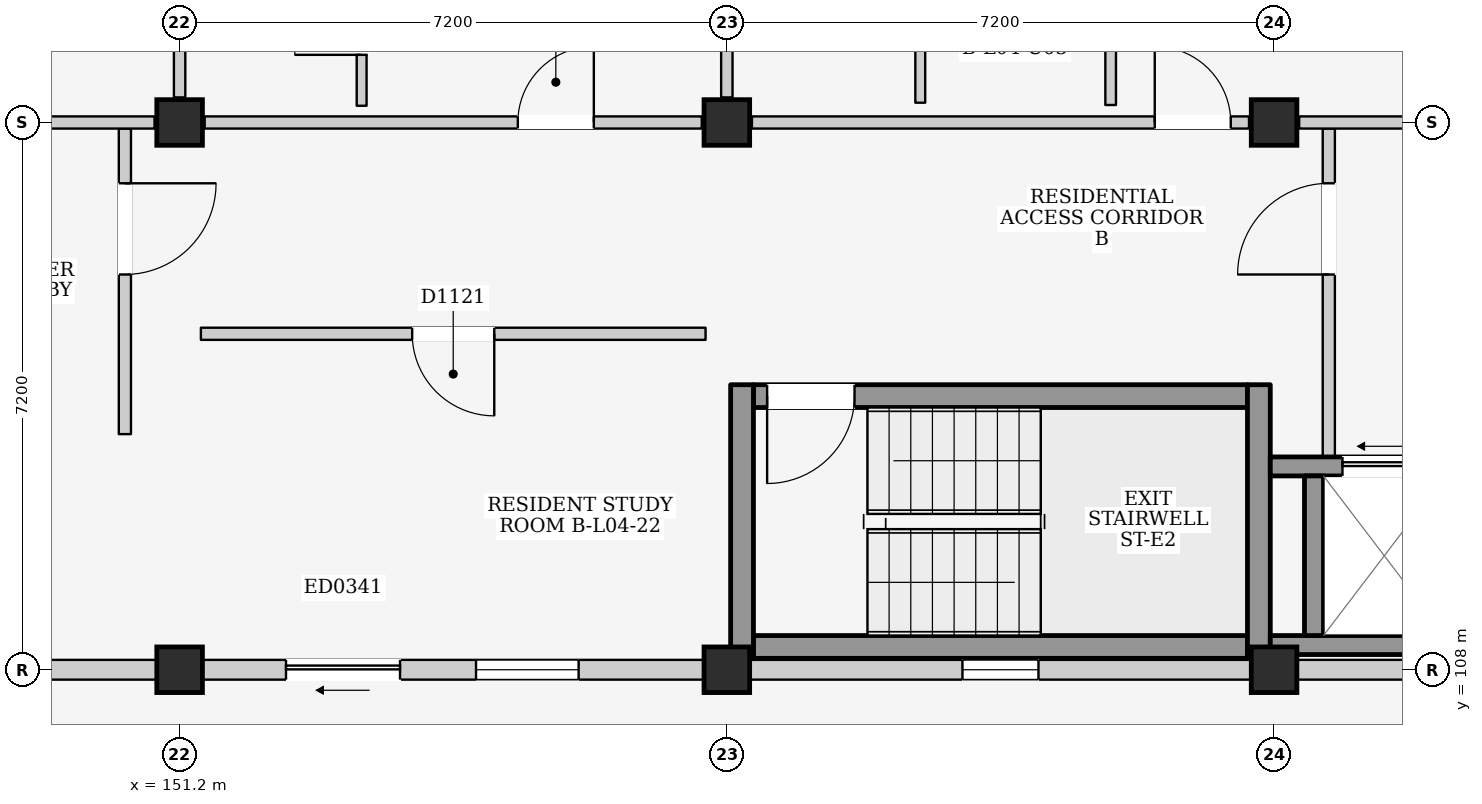
"""IFC4 building model, lengths in metres.
Left out: names, types, materials, properties, quantities, classifications, styles, units other than length and angle.
Written with IfcOpenShell. Run it as: python <this file> out.ifc"""

import sys

from ifc_helpers import new_model, si_unit, direction, frame, frame_2d, origin, origin_2d, place, context, subcontext, project, spatial, rectangle, extrude, element, fill, save


model = new_model("IFC4")
c1 = context("Model", 3, precision=1e-05, world=origin(), true_north=direction((0.0, 1.0)))
c2 = subcontext(c1, "Body", "Model", "MODEL_VIEW")
j1 = project(units=[si_unit("LENGTHUNIT", "METRE"), si_unit("PLANEANGLEUNIT", "RADIAN")], contexts=[c1])
p1 = place(None, origin())
s1 = spatial("IfcSite", under=j1, at=p1, CompositionType="ELEMENT")
p2 = place(p1, origin())
s2 = spatial("IfcBuilding", under=s1, at=p2, CompositionType="ELEMENT")
p3 = place(p2, frame((0.0, 0.0, 15.4)))
s3 = spatial("IfcBuildingStorey", under=s2, at=p3, CompositionType="ELEMENT", Elevation=15.4)
for number, where, z_axis, x_axis in (
    (1, (151.2, 108.0, 0.0), (0.0, 0.0, 1.0), (1.0, 0.0, 0.0)),
    (2, (151.2, 115.2, 0.0), (0.0, 0.0, 1.0), (1.0, 0.0, 0.0)),
    (3, (158.4, 108.0, 0.0), (0.0, 0.0, 1.0), (1.0, 0.0, 0.0)),
    (4, (158.4, 115.2, 0.0), (0.0, 0.0, 1.0), (1.0, 0.0, 0.0)),
    (5, (165.6, 108.0, 0.0), (0.0, 0.0, 1.0), (1.0, 0.0, 0.0)),
    (6, (165.6, 115.2, 0.0), (0.0, 0.0, 1.0), (1.0, 0.0, 0.0)),
):
    element("IfcColumn", number, at=place(p3, frame(where, z_axis=z_axis, x_axis=x_axis)), inside=s3, PredefinedType="COLUMN", context=c2, shape_type="SweptSolid", body=[
        extrude(rectangle(XDim=0.6, YDim=0.6, at=origin_2d()), origin(), (0.0, 0.0, 1.0), 3.2),
    ])
p4 = place(p3, frame((144.3, 108.0, 0.0), z_axis=(0.0, 0.0, 1.0), x_axis=(1.0, 0.0, 0.0)))
e7 = element("IfcWall", 7, at=p4, inside=s3, PredefinedType="ELEMENTEDWALL", context=c2, shape_type="SweptSolid", body=[
    extrude(rectangle(XDim=6.6, YDim=0.26, at=frame_2d((3.3, 0.0))), origin(), (0.0, 0.0, 1.0), 2.335),
])
p5 = place(p4, frame((2.8, 0.0, 1.2)))
e8 = element("IfcOpeningElement", 8, at=p5, cuts=e7, PredefinedType="OPENING", context=c2, shape_type="SweptSolid", body=[
    extrude(rectangle(XDim=1.0, YDim=0.9, at=frame_2d((0.5, 0.45))), frame((0.0, 0.145, 0.0), z_axis=(0.0, -1.0, 0.0), x_axis=(1.0, 0.0, 0.0)), (0.0, 0.0, 1.0), 0.29),
])
p6 = place(p3, frame((151.5, 108.0, 0.0), z_axis=(0.0, 0.0, 1.0), x_axis=(1.0, 0.0, 0.0)))
e9 = element("IfcWall", 9, at=p6, inside=s3, PredefinedType="ELEMENTEDWALL", context=c2, shape_type="SweptSolid", body=[
    extrude(rectangle(XDim=6.6, YDim=0.26, at=frame_2d((3.3, 0.0))), origin(), (0.0, 0.0, 1.0), 2.335),
])
p7 = place(p6, frame((1.1, 0.0, 0.0)))
e10 = element("IfcOpeningElement", 10, at=p7, cuts=e9, PredefinedType="OPENING", context=c2, shape_type="SweptSolid", body=[
    extrude(rectangle(XDim=1.5, YDim=2.12, at=frame_2d((0.75, 1.06))), frame((0.0, 0.145, 0.0), z_axis=(0.0, -1.0, 0.0), x_axis=(1.0, 0.0, 0.0)), (0.0, 0.0, 1.0), 0.29),
])
p8 = place(p6, frame((3.6, 0.0, 0.725)))
e11 = element("IfcOpeningElement", 11, at=p8, cuts=e9, PredefinedType="OPENING", context=c2, shape_type="SweptSolid", body=[
    extrude(rectangle(XDim=1.35, YDim=1.5, at=frame_2d((0.675, 0.75))), frame((0.0, 0.145, 0.0), z_axis=(0.0, -1.0, 0.0), x_axis=(1.0, 0.0, 0.0)), (0.0, 0.0, 1.0), 0.29),
])
p9 = place(p3, frame((158.7, 108.0, 0.0), z_axis=(0.0, 0.0, 1.0), x_axis=(1.0, 0.0, 0.0)))
e12 = element("IfcWall", 12, at=p9, inside=s3, PredefinedType="ELEMENTEDWALL", context=c2, shape_type="SweptSolid", body=[
    extrude(rectangle(XDim=6.6, YDim=0.26, at=frame_2d((3.3, 0.0))), origin(), (0.0, 0.0, 1.0), 2.335),
])
p10 = place(p9, frame((2.8, 0.0, 1.2)))
e13 = element("IfcOpeningElement", 13, at=p10, cuts=e12, PredefinedType="OPENING", context=c2, shape_type="SweptSolid", body=[
    extrude(rectangle(XDim=1.0, YDim=0.9, at=frame_2d((0.5, 0.45))), frame((0.0, 0.145, 0.0), z_axis=(0.0, -1.0, 0.0), x_axis=(1.0, 0.0, 0.0)), (0.0, 0.0, 1.0), 0.29),
])
p11 = place(p3, frame((165.9, 108.0, 0.0), z_axis=(0.0, 0.0, 1.0), x_axis=(1.0, 0.0, 0.0)))
e14 = element("IfcWall", 14, at=p11, inside=s3, PredefinedType="ELEMENTEDWALL", context=c2, shape_type="SweptSolid", body=[
    extrude(rectangle(XDim=6.6, YDim=0.26, at=frame_2d((3.3, 0.0))), origin(), (0.0, 0.0, 1.0), 2.335),
])
p12 = place(p11, frame((2.8, 0.0, 1.2)))
e15 = element("IfcOpeningElement", 15, at=p12, cuts=e14, PredefinedType="OPENING", context=c2, shape_type="SweptSolid", body=[
    extrude(rectangle(XDim=1.0, YDim=0.9, at=frame_2d((0.5, 0.45))), frame((0.0, 0.145, 0.0), z_axis=(0.0, -1.0, 0.0), x_axis=(1.0, 0.0, 0.0)), (0.0, 0.0, 1.0), 0.29),
])
p13 = place(p3, frame((150.48, 111.1, 0.0), z_axis=(0.0, 0.0, 1.0), x_axis=(0.0, 1.0, 0.0)))
e16 = element("IfcWall", 16, at=p13, inside=s3, PredefinedType="PARTITIONING", context=c2, shape_type="SweptSolid", body=[
    extrude(rectangle(XDim=4.02, YDim=0.16, at=frame_2d((2.01, 0.0))), origin(), (0.0, 0.0, 1.0), 2.95),
])
p14 = place(p13, frame((2.1, 0.0, 0.0)))
e17 = element("IfcOpeningElement", 17, at=p14, cuts=e16, PredefinedType="OPENING", context=c2, shape_type="SweptSolid", body=[
    extrude(rectangle(XDim=1.2, YDim=2.2, at=frame_2d((0.6, 1.1))), frame((0.0, 0.095, 0.0), z_axis=(0.0, -1.0, 0.0), x_axis=(1.0, 0.0, 0.0)), (0.0, 0.0, 1.0), 0.19),
])
p15 = place(p3, frame((158.75, 108.3, 0.0), z_axis=(0.0, 0.0, 1.0), x_axis=(1.0, 0.0, 0.0)))
e18 = element("IfcWall", 18, at=p15, inside=s3, PredefinedType="SHEAR", context=c2, shape_type="SweptSolid", body=[
    extrude(rectangle(XDim=6.5, YDim=0.3, at=frame_2d((3.25, 0.0))), origin(), (0.0, 0.0, 1.0), 2.95),
])
p16 = place(p3, frame((158.75, 111.6, 0.0), z_axis=(0.0, 0.0, 1.0), x_axis=(1.0, 0.0, 0.0)))
e19 = element("IfcWall", 19, at=p16, inside=s3, PredefinedType="SHEAR", context=c2, shape_type="SweptSolid", body=[
    extrude(rectangle(XDim=6.5, YDim=0.3, at=frame_2d((3.25, 0.0))), origin(), (0.0, 0.0, 1.0), 2.95),
])
p17 = place(p16, frame((0.18, 0.0, 0.0)))
e20 = element("IfcOpeningElement", 20, at=p17, cuts=e19, PredefinedType="OPENING", context=c2, shape_type="SweptSolid", body=[
    extrude(rectangle(XDim=1.15, YDim=2.2, at=frame_2d((0.575, 1.1))), frame((0.0, 0.165, 0.0), z_axis=(0.0, -1.0, 0.0), x_axis=(1.0, 0.0, 0.0)), (0.0, 0.0, 1.0), 0.33),
])
for number, where, z_axis, x_axis in (
    (21, (158.6, 108.15, 0.0), (0.0, 0.0, 1.0), (0.0, 1.0, 0.0)),
    (22, (165.4, 108.15, 0.0), (0.0, 0.0, 1.0), (0.0, 1.0, 0.0)),
):
    element("IfcWall", number, at=place(p3, frame(where, z_axis=z_axis, x_axis=x_axis)), inside=s3, PredefinedType="SHEAR", context=c2, shape_type="SweptSolid", body=[
        extrude(rectangle(XDim=3.6, YDim=0.3, at=frame_2d((1.8, 0.0))), origin(), (0.0, 0.0, 1.0), 2.95),
    ])
p18 = place(p3, frame((166.32, 110.8, 0.0), z_axis=(0.0, 0.0, 1.0), x_axis=(0.0, 1.0, 0.0)))
e23 = element("IfcWall", 23, at=p18, inside=s3, PredefinedType="PARTITIONING", context=c2, shape_type="SweptSolid", body=[
    extrude(rectangle(XDim=4.32, YDim=0.16, at=frame_2d((2.16, 0.0))), origin(), (0.0, 0.0, 1.0), 2.95),
])
p19 = place(p18, frame((2.4, 0.0, 0.0)))
e24 = element("IfcOpeningElement", 24, at=p19, cuts=e23, PredefinedType="OPENING", context=c2, shape_type="SweptSolid", body=[
    extrude(rectangle(XDim=1.2, YDim=2.2, at=frame_2d((0.6, 1.1))), frame((0.0, 0.095, 0.0), z_axis=(0.0, -1.0, 0.0), x_axis=(1.0, 0.0, 0.0)), (0.0, 0.0, 1.0), 0.19),
])
p20 = place(p3, frame((165.55, 108.325, 0.0), z_axis=(0.0, 0.0, 1.0), x_axis=(1.0, 0.0, 0.0)))
e25 = element("IfcWall", 25, at=p20, inside=s3, PredefinedType="SHEAR", context=c2, shape_type="SweptSolid", body=[
    extrude(rectangle(XDim=2.55, YDim=0.25, at=frame_2d((1.275, 0.0))), origin(), (0.0, 0.0, 1.0), 2.95),
])
p21 = place(p3, frame((165.55, 110.675, 0.0), z_axis=(0.0, 0.0, 1.0), x_axis=(1.0, 0.0, 0.0)))
e26 = element("IfcWall", 26, at=p21, inside=s3, PredefinedType="SHEAR", context=c2, shape_type="SweptSolid", body=[
    extrude(rectangle(XDim=2.55, YDim=0.25, at=frame_2d((1.275, 0.0))), origin(), (0.0, 0.0, 1.0), 2.95),
])
p22 = place(p21, frame((0.95, 0.0, 0.0)))
e27 = element("IfcOpeningElement", 27, at=p22, cuts=e26, PredefinedType="OPENING", context=c2, shape_type="SweptSolid", body=[
    extrude(rectangle(XDim=1.1, YDim=2.15, at=frame_2d((0.55, 1.075))), frame((0.0, 0.14, 0.0), z_axis=(0.0, -1.0, 0.0), x_axis=(1.0, 0.0, 0.0)), (0.0, 0.0, 1.0), 0.28),
])
p23 = place(p3, frame((166.125, 108.45, 0.0), z_axis=(0.0, 0.0, 1.0), x_axis=(0.0, 1.0, 0.0)))
e28 = element("IfcWall", 28, at=p23, inside=s3, PredefinedType="SHEAR", context=c2, shape_type="SweptSolid", body=[
    extrude(rectangle(XDim=2.1, YDim=0.25, at=frame_2d((1.05, 0.0))), origin(), (0.0, 0.0, 1.0), 2.95),
])
p24 = place(p3, frame((144.33, 115.2, 0.0), z_axis=(0.0, 0.0, 1.0), x_axis=(1.0, 0.0, 0.0)))
e29 = element("IfcWall", 29, at=p24, inside=s3, PredefinedType="PARTITIONING", context=c2, shape_type="SweptSolid", body=[
    extrude(rectangle(XDim=6.54, YDim=0.16, at=frame_2d((3.27, 0.0))), origin(), (0.0, 0.0, 1.0), 2.335),
])
p25 = place(p3, frame((151.2, 115.53, 0.0), z_axis=(0.0, 0.0, 1.0), x_axis=(0.0, 1.0, 0.0)))
e30 = element("IfcWall", 30, at=p25, inside=s3, PredefinedType="PARTITIONING", context=c2, shape_type="SweptSolid", body=[
    extrude(rectangle(XDim=6.54, YDim=0.15, at=frame_2d((3.27, 0.0))), origin(), (0.0, 0.0, 1.0), 2.385),
])
p26 = place(p3, frame((151.53, 115.2, 0.0), z_axis=(0.0, 0.0, 1.0), x_axis=(1.0, 0.0, 0.0)))
e31 = element("IfcWall", 31, at=p26, inside=s3, PredefinedType="PARTITIONING", context=c2, shape_type="SweptSolid", body=[
    extrude(rectangle(XDim=6.54, YDim=0.16, at=frame_2d((3.27, 0.0))), origin(), (0.0, 0.0, 1.0), 2.335),
])
p27 = place(p26, frame((4.12, 0.0, 0.0)))
e32 = element("IfcOpeningElement", 32, at=p27, cuts=e31, PredefinedType="OPENING", context=c2, shape_type="SweptSolid", body=[
    extrude(rectangle(XDim=1.0, YDim=2.15, at=frame_2d((0.5, 1.075))), frame((0.0, 0.095, 0.0), z_axis=(0.0, -1.0, 0.0), x_axis=(1.0, 0.0, 0.0)), (0.0, 0.0, 1.0), 0.19),
])
p28 = place(p3, frame((158.4, 115.53, 0.0), z_axis=(0.0, 0.0, 1.0), x_axis=(0.0, 1.0, 0.0)))
e33 = element("IfcWall", 33, at=p28, inside=s3, PredefinedType="PARTITIONING", context=c2, shape_type="SweptSolid", body=[
    extrude(rectangle(XDim=6.54, YDim=0.15, at=frame_2d((3.27, 0.0))), origin(), (0.0, 0.0, 1.0), 2.385),
])
p29 = place(p3, frame((153.595, 115.42, 0.0), z_axis=(0.0, 0.0, 1.0), x_axis=(0.0, 1.0, 0.0)))
e34 = element("IfcWall", 34, at=p29, inside=s3, PredefinedType="PARTITIONING", context=c2, shape_type="SweptSolid", body=[
    extrude(rectangle(XDim=2.22, YDim=0.13, at=frame_2d((1.11, 0.0))), origin(), (0.0, 0.0, 1.0), 2.95),
])
p30 = place(p29, frame((0.67, 0.0, 0.0)))
e35 = element("IfcOpeningElement", 35, at=p30, cuts=e34, PredefinedType="OPENING", context=c2, shape_type="SweptSolid", body=[
    extrude(rectangle(XDim=0.88, YDim=2.1, at=frame_2d((0.44, 1.05))), frame((0.0, 0.08, 0.0), z_axis=(0.0, -1.0, 0.0), x_axis=(1.0, 0.0, 0.0)), (0.0, 0.0, 1.0), 0.16),
])
p31 = place(p3, frame((158.73, 115.2, 0.0), z_axis=(0.0, 0.0, 1.0), x_axis=(1.0, 0.0, 0.0)))
e36 = element("IfcWall", 36, at=p31, inside=s3, PredefinedType="PARTITIONING", context=c2, shape_type="SweptSolid", body=[
    extrude(rectangle(XDim=6.54, YDim=0.16, at=frame_2d((3.27, 0.0))), origin(), (0.0, 0.0, 1.0), 2.335),
])
p32 = place(p31, frame((5.3, 0.0, 0.0)))
e37 = element("IfcOpeningElement", 37, at=p32, cuts=e36, PredefinedType="OPENING", context=c2, shape_type="SweptSolid", body=[
    extrude(rectangle(XDim=1.0, YDim=2.15, at=frame_2d((0.5, 1.075))), frame((0.0, 0.095, 0.0), z_axis=(0.0, -1.0, 0.0), x_axis=(1.0, 0.0, 0.0)), (0.0, 0.0, 1.0), 0.19),
])
p33 = place(p3, frame((165.93, 115.2, 0.0), z_axis=(0.0, 0.0, 1.0), x_axis=(1.0, 0.0, 0.0)))
e38 = element("IfcWall", 38, at=p33, inside=s3, PredefinedType="PARTITIONING", context=c2, shape_type="SweptSolid", body=[
    extrude(rectangle(XDim=6.54, YDim=0.16, at=frame_2d((3.27, 0.0))), origin(), (0.0, 0.0, 1.0), 2.335),
])
p34 = place(p3, frame((160.945, 115.46, 0.0), z_axis=(0.0, 0.0, 1.0), x_axis=(0.0, 1.0, 0.0)))
e39 = element("IfcWall", 39, at=p34, inside=s3, PredefinedType="PARTITIONING", context=c2, shape_type="SweptSolid", body=[
    extrude(rectangle(XDim=3.04, YDim=0.13, at=frame_2d((1.52, 0.0))), origin(), (0.0, 0.0, 1.0), 2.95),
])
p35 = place(p3, frame((163.45, 115.43, 0.0), z_axis=(0.0, 0.0, 1.0), x_axis=(0.0, 1.0, 0.0)))
e40 = element("IfcWall", 40, at=p35, inside=s3, PredefinedType="PARTITIONING", context=c2, shape_type="SweptSolid", body=[
    extrude(rectangle(XDim=3.06, YDim=0.14, at=frame_2d((1.53, 0.0))), origin(), (0.0, 0.0, 1.0), 2.95),
])
p36 = place(p3, frame((151.48, 112.42, 0.0), z_axis=(0.0, 0.0, 1.0), x_axis=(1.0, 0.0, 0.0)))
e41 = element("IfcWall", 41, at=p36, inside=s3, PredefinedType="PARTITIONING", context=c2, shape_type="SweptSolid", body=[
    extrude(rectangle(XDim=6.64, YDim=0.16, at=frame_2d((3.32, 0.0))), origin(), (0.0, 0.0, 1.0), 2.95),
])
p37 = place(p36, frame((2.78, 0.0, 0.0)))
e42 = element("IfcOpeningElement", 42, at=p37, cuts=e41, PredefinedType="OPENING", context=c2, shape_type="SweptSolid", body=[
    extrude(rectangle(XDim=1.08, YDim=2.22, at=frame_2d((0.54, 1.11))), frame((0.0, 0.095, 0.0), z_axis=(0.0, -1.0, 0.0), x_axis=(1.0, 0.0, 0.0)), (0.0, 0.0, 1.0), 0.19),
])
p38 = place(p7, frame((1.5, 0.0, 0.0), z_axis=(0.0, 0.0, 1.0), x_axis=(-1.0, 0.0, 0.0)))
e43 = element("IfcDoor", 43, at=p38, inside=s3, OperationType="SLIDING_TO_LEFT", PredefinedType="DOOR", context=c2, shape_type="SweptSolid", body=[
    extrude(rectangle(XDim=1.5, YDim=2.12, at=frame_2d((0.75, 1.06))), frame((0.0, 0.025, 0.0), z_axis=(0.0, -1.0, 0.0), x_axis=(1.0, 0.0, 0.0)), (0.0, 0.0, 1.0), 0.05),
])
fill(e10, e43)
p39 = place(p8, origin())
e44 = element("IfcWindow", 44, at=p39, inside=s3, PartitioningType="SINGLE_PANEL", PredefinedType="WINDOW", context=c2, shape_type="SweptSolid", body=[
    extrude(rectangle(XDim=1.35, YDim=1.5, at=frame_2d((0.675, 0.75))), frame((0.0, 0.03, 0.0), z_axis=(0.0, -1.0, 0.0), x_axis=(1.0, 0.0, 0.0)), (0.0, 0.0, 1.0), 0.06),
])
fill(e11, e44)
p40 = place(p10, origin())
e45 = element("IfcWindow", 45, at=p40, inside=s3, PartitioningType="SINGLE_PANEL", PredefinedType="WINDOW", context=c2, shape_type="SweptSolid", body=[
    extrude(rectangle(XDim=1.0, YDim=0.9, at=frame_2d((0.5, 0.45))), frame((0.0, 0.03, 0.0), z_axis=(0.0, -1.0, 0.0), x_axis=(1.0, 0.0, 0.0)), (0.0, 0.0, 1.0), 0.06),
])
fill(e13, e45)
p41 = place(p14, frame((1.2, 0.0, 0.0), z_axis=(0.0, 0.0, 1.0), x_axis=(-1.0, 0.0, 0.0)))
e46 = element("IfcDoor", 46, at=p41, inside=s3, OperationType="SINGLE_SWING_LEFT", PredefinedType="DOOR", context=c2, shape_type="SweptSolid", body=[
    extrude(rectangle(XDim=1.2, YDim=2.2, at=frame_2d((0.6, 1.1))), frame((0.0, 0.025, 0.0), z_axis=(0.0, -1.0, 0.0), x_axis=(1.0, 0.0, 0.0)), (0.0, 0.0, 1.0), 0.05),
])
fill(e17, e46)
p42 = place(p17, frame((1.15, 0.0, 0.0), z_axis=(0.0, 0.0, 1.0), x_axis=(-1.0, 0.0, 0.0)))
e47 = element("IfcDoor", 47, at=p42, inside=s3, OperationType="SINGLE_SWING_RIGHT", PredefinedType="DOOR", context=c2, shape_type="SweptSolid", body=[
    extrude(rectangle(XDim=1.15, YDim=2.2, at=frame_2d((0.575, 1.1))), frame((0.0, 0.025, 0.0), z_axis=(0.0, -1.0, 0.0), x_axis=(1.0, 0.0, 0.0)), (0.0, 0.0, 1.0), 0.05),
])
fill(e20, e47)
p43 = place(p19, origin())
e48 = element("IfcDoor", 48, at=p43, inside=s3, OperationType="SINGLE_SWING_LEFT", PredefinedType="DOOR", context=c2, shape_type="SweptSolid", body=[
    extrude(rectangle(XDim=1.2, YDim=2.2, at=frame_2d((0.6, 1.1))), frame((0.0, 0.025, 0.0), z_axis=(0.0, -1.0, 0.0), x_axis=(1.0, 0.0, 0.0)), (0.0, 0.0, 1.0), 0.05),
])
fill(e24, e48)
p44 = place(p22, origin())
e49 = element("IfcDoor", 49, at=p44, inside=s3, OperationType="SLIDING_TO_LEFT", PredefinedType="DOOR", context=c2, shape_type="SweptSolid", body=[
    extrude(rectangle(XDim=1.1, YDim=2.15, at=frame_2d((0.55, 1.075))), frame((0.0, 0.025, 0.0), z_axis=(0.0, -1.0, 0.0), x_axis=(1.0, 0.0, 0.0)), (0.0, 0.0, 1.0), 0.05),
])
fill(e27, e49)
p45 = place(p27, origin())
e50 = element("IfcDoor", 50, at=p45, inside=s3, OperationType="SINGLE_SWING_RIGHT", PredefinedType="DOOR", context=c2, shape_type="SweptSolid", body=[
    extrude(rectangle(XDim=1.0, YDim=2.15, at=frame_2d((0.5, 1.075))), frame((0.0, 0.025, 0.0), z_axis=(0.0, -1.0, 0.0), x_axis=(1.0, 0.0, 0.0)), (0.0, 0.0, 1.0), 0.05),
])
fill(e32, e50)
p46 = place(p30, origin())
e51 = element("IfcDoor", 51, at=p46, inside=s3, OperationType="SINGLE_SWING_LEFT", PredefinedType="DOOR", context=c2, shape_type="SweptSolid", body=[
    extrude(rectangle(XDim=0.88, YDim=2.1, at=frame_2d((0.44, 1.05))), frame((0.0, 0.025, 0.0), z_axis=(0.0, -1.0, 0.0), x_axis=(1.0, 0.0, 0.0)), (0.0, 0.0, 1.0), 0.05),
])
fill(e35, e51)
p47 = place(p32, origin())
e52 = element("IfcDoor", 52, at=p47, inside=s3, OperationType="SINGLE_SWING_LEFT", PredefinedType="DOOR", context=c2, shape_type="SweptSolid", body=[
    extrude(rectangle(XDim=1.0, YDim=2.15, at=frame_2d((0.5, 1.075))), frame((0.0, 0.025, 0.0), z_axis=(0.0, -1.0, 0.0), x_axis=(1.0, 0.0, 0.0)), (0.0, 0.0, 1.0), 0.05),
])
fill(e37, e52)
p48 = place(p37, frame((1.08, 0.0, 0.0), z_axis=(0.0, 0.0, 1.0), x_axis=(-1.0, 0.0, 0.0)))
e53 = element("IfcDoor", 53, at=p48, inside=s3, OperationType="SINGLE_SWING_LEFT", PredefinedType="DOOR", context=c2, shape_type="SweptSolid", body=[
    extrude(rectangle(XDim=1.08, YDim=2.22, at=frame_2d((0.54, 1.11))), frame((0.0, 0.025, 0.0), z_axis=(0.0, -1.0, 0.0), x_axis=(1.0, 0.0, 0.0)), (0.0, 0.0, 1.0), 0.05),
])
fill(e42, e53)
save(model, sys.argv[1])
